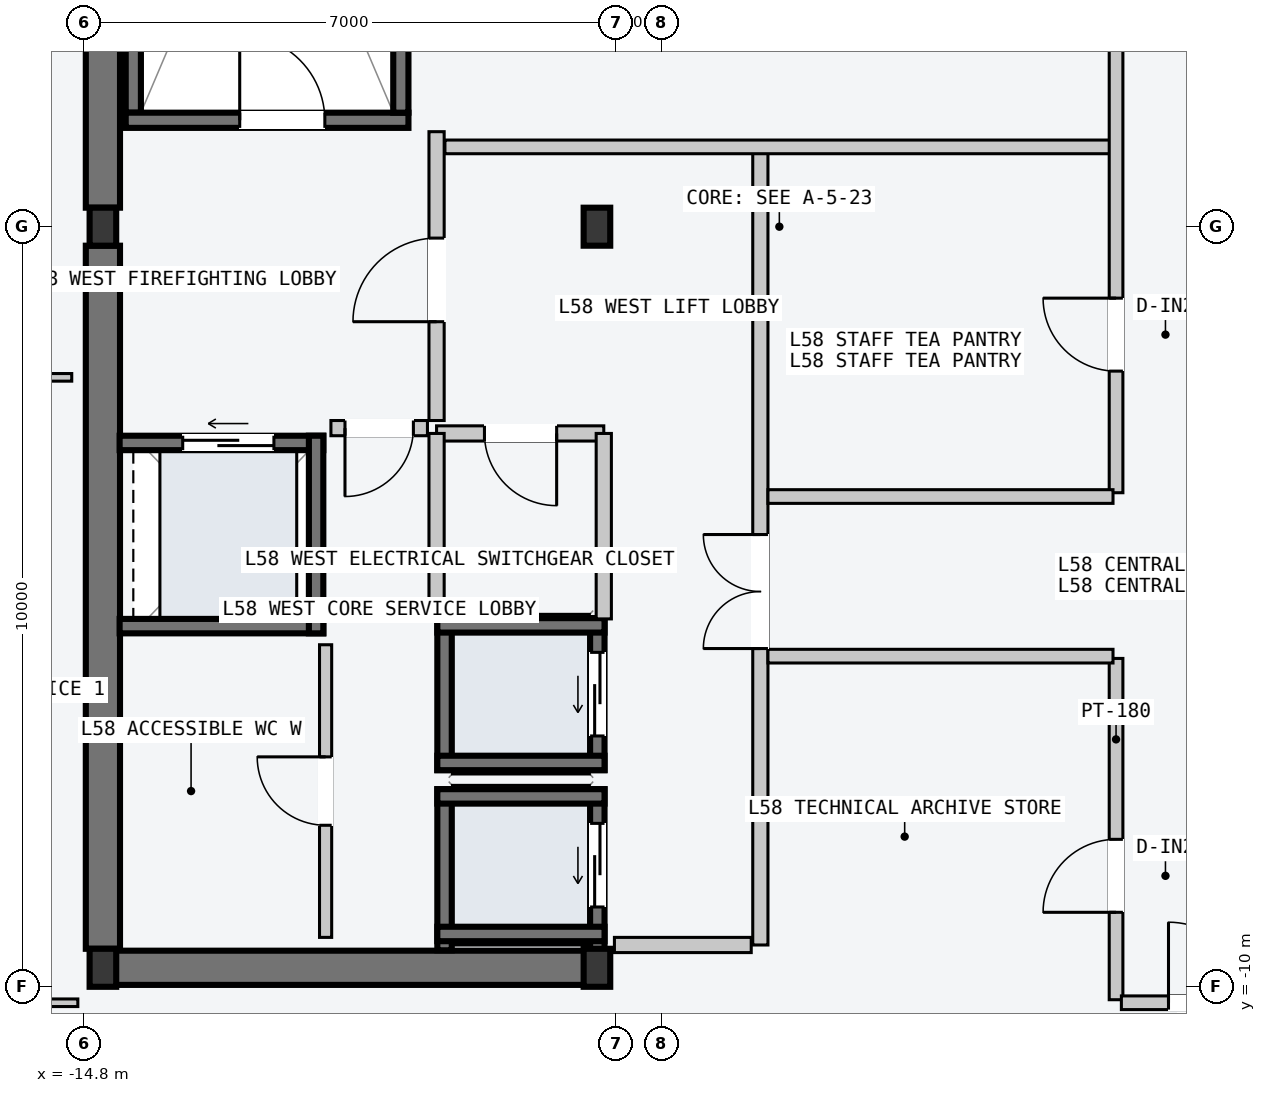
"""IFC4 building model, lengths in metres.
Left out: names, types, materials, properties, quantities, classifications, styles, units other than length and angle.
Written with IfcOpenShell. Run it as: python <this file> out.ifc"""

import sys

from ifc_helpers import new_model, si_unit, direction, frame, frame_2d, origin, origin_2d, place, context, subcontext, project, spatial, rectangle, i_section, extrude, element, fill, save


model = new_model("IFC4")
c1 = context("Model", 3, precision=1e-05, world=origin(), true_north=direction((0.0, 1.0)))
c2 = subcontext(c1, "Body", "Model", "MODEL_VIEW")
j1 = project(units=[si_unit("LENGTHUNIT", "METRE"), si_unit("PLANEANGLEUNIT", "RADIAN")], contexts=[c1])
p1 = place(None, origin())
s1 = spatial("IfcSite", under=j1, at=p1, CompositionType="ELEMENT")
p2 = place(p1, origin())
s2 = spatial("IfcBuilding", under=s1, at=p2, CompositionType="ELEMENT")
p3 = place(p2, frame((0.0, 0.0, 222.0)))
s3 = spatial("IfcBuildingStorey", under=s2, at=p3, CompositionType="ELEMENT", Elevation=222.0)
p4 = place(p3, frame((-14.53, -9.75, -0.2), z_axis=(0.0, 0.0, 1.0), x_axis=(1.0, 0.0, 0.0)))
e1 = element("IfcWall", 1, at=p4, inside=s3, PredefinedType="SHEAR", context=c2, shape_type="SweptSolid", body=[
    extrude(rectangle(XDim=6.46, YDim=0.45, at=frame_2d((3.23, 0.0))), origin(), (0.0, 0.0, 1.0), 3.6),
])
for number, where, z_axis, x_axis in (
    (2, (-14.55, -9.5, -0.2), (0.0, 0.0, 1.0), (0.0, 1.0, 0.0)),
    (3, (-14.55, 0.25, -0.2), (0.0, 0.0, 1.0), (0.0, 1.0, 0.0)),
):
    element("IfcWall", number, at=place(p3, frame(where, z_axis=z_axis, x_axis=x_axis)), inside=s3, PredefinedType="SHEAR", context=c2, shape_type="SweptSolid", body=[
        extrude(rectangle(XDim=9.25, YDim=0.45, at=frame_2d((4.625, 0.0))), origin(), (0.0, 0.0, 1.0), 3.6),
    ])
p5 = place(p3, frame((-14.15, 1.5, -0.2), z_axis=(0.0, 0.0, 1.0), x_axis=(0.0, 1.0, 0.0)))
e4 = element("IfcWall", 4, at=p5, inside=s3, PredefinedType="SOLIDWALL", context=c2, shape_type="SweptSolid", body=[
    extrude(rectangle(XDim=7.8, YDim=0.2, at=frame_2d((3.9, 0.0))), origin(), (0.0, 0.0, 1.0), 3.6),
])
p6 = place(p3, frame((-14.25, 1.4, -0.2), z_axis=(0.0, 0.0, 1.0), x_axis=(1.0, 0.0, 0.0)))
e5 = element("IfcWall", 5, at=p6, inside=s3, PredefinedType="SOLIDWALL", context=c2, shape_type="SweptSolid", body=[
    extrude(rectangle(XDim=3.72, YDim=0.2, at=frame_2d((1.86, 0.0))), origin(), (0.0, 0.0, 1.0), 3.6),
])
p7 = place(p6, frame((1.5, 0.0, 0.2)))
e6 = element("IfcOpeningElement", 6, at=p7, cuts=e5, PredefinedType="OPENING", context=c2, shape_type="SweptSolid", body=[
    extrude(rectangle(XDim=1.12, YDim=2.18, at=frame_2d((0.56, 1.09))), frame((0.0, 0.11, 0.0), z_axis=(0.0, -1.0, 0.0), x_axis=(1.0, 0.0, 0.0)), (0.0, 0.0, 1.0), 0.22),
])
p8 = place(p3, frame((-10.63, 1.5, -0.2), z_axis=(0.0, 0.0, 1.0), x_axis=(0.0, 1.0, 0.0)))
e7 = element("IfcWall", 7, at=p8, inside=s3, PredefinedType="SOLIDWALL", context=c2, shape_type="SweptSolid", body=[
    extrude(rectangle(XDim=7.8, YDim=0.2, at=frame_2d((3.9, 0.0))), origin(), (0.0, 0.0, 1.0), 3.6),
])
for number, where, z_axis, x_axis in (
    (8, (-14.55, -9.75, 0.0), (0.0, 0.0, 1.0), (1.0, 0.0, 0.0)),
    (9, (-14.55, 0.0, 0.0), (0.0, 0.0, 1.0), (1.0, 0.0, 0.0)),
    (10, (-8.05, -9.75, 0.0), (0.0, 0.0, 1.0), (1.0, 0.0, 0.0)),
    (11, (-8.05, 0.0, 0.0), (0.0, 0.0, 1.0), (1.0, 0.0, 0.0)),
):
    element("IfcColumn", number, at=place(p3, frame(where, z_axis=z_axis, x_axis=x_axis)), inside=s3, PredefinedType="COLUMN", context=c2, shape_type="SweptSolid", body=[
        extrude(i_section(OverallWidth=0.35, OverallDepth=0.5, WebThickness=0.02, FlangeThickness=0.032, at=origin_2d()), origin(), (0.0, 0.0, 1.0), 3.6),
    ])
p9 = place(p3, frame((-8.045, -9.52, -0.2), z_axis=(0.0, 0.0, 1.0), x_axis=(0.0, 1.0, 0.0)))
e12 = element("IfcWall", 12, at=p9, inside=s3, PredefinedType="SOLIDWALL", context=c2, shape_type="SweptSolid", body=[
    extrude(rectangle(XDim=2.12, YDim=0.19, at=frame_2d((1.06, 0.0))), origin(), (0.0, 0.0, 1.0), 3.6),
])
p10 = place(p9, frame((0.57, 0.0, 0.2)))
e13 = element("IfcOpeningElement", 13, at=p10, cuts=e12, PredefinedType="OPENING", context=c2, shape_type="SweptSolid", body=[
    extrude(rectangle(XDim=1.1, YDim=2.2, at=frame_2d((0.55, 1.1))), frame((0.0, 0.105, 0.0), z_axis=(0.0, -1.0, 0.0), x_axis=(1.0, 0.0, 0.0)), (0.0, 0.0, 1.0), 0.21),
])
p11 = place(p3, frame((-10.055, -9.52, -0.2), z_axis=(0.0, 0.0, 1.0), x_axis=(0.0, 1.0, 0.0)))
e14 = element("IfcWall", 14, at=p11, inside=s3, PredefinedType="SOLIDWALL", context=c2, shape_type="SweptSolid", body=[
    extrude(rectangle(XDim=2.12, YDim=0.19, at=frame_2d((1.06, 0.0))), origin(), (0.0, 0.0, 1.0), 3.6),
])
for number, where, z_axis, x_axis in (
    (15, (-10.15, -7.495, -0.2), (0.0, 0.0, 1.0), (1.0, 0.0, 0.0)),
    (16, (-10.15, -9.305, -0.2), (0.0, 0.0, 1.0), (1.0, 0.0, 0.0)),
):
    element("IfcWall", number, at=place(p3, frame(where, z_axis=z_axis, x_axis=x_axis)), inside=s3, PredefinedType="SOLIDWALL", context=c2, shape_type="SweptSolid", body=[
        extrude(rectangle(XDim=2.2, YDim=0.19, at=frame_2d((1.1, 0.0))), origin(), (0.0, 0.0, 1.0), 3.6),
    ])
p12 = place(p3, frame((-8.045, -7.15, -0.2), z_axis=(0.0, 0.0, 1.0), x_axis=(0.0, 1.0, 0.0)))
e17 = element("IfcWall", 17, at=p12, inside=s3, PredefinedType="SOLIDWALL", context=c2, shape_type="SweptSolid", body=[
    extrude(rectangle(XDim=2.0, YDim=0.19, at=frame_2d((1.0, 0.0))), origin(), (0.0, 0.0, 1.0), 3.6),
])
p13 = place(p12, frame((0.45, 0.0, 0.2)))
e18 = element("IfcOpeningElement", 18, at=p13, cuts=e17, PredefinedType="OPENING", context=c2, shape_type="SweptSolid", body=[
    extrude(rectangle(XDim=1.1, YDim=2.2, at=frame_2d((0.55, 1.1))), frame((0.0, 0.105, 0.0), z_axis=(0.0, -1.0, 0.0), x_axis=(1.0, 0.0, 0.0)), (0.0, 0.0, 1.0), 0.21),
])
p14 = place(p3, frame((-10.055, -7.15, -0.2), z_axis=(0.0, 0.0, 1.0), x_axis=(0.0, 1.0, 0.0)))
e19 = element("IfcWall", 19, at=p14, inside=s3, PredefinedType="SOLIDWALL", context=c2, shape_type="SweptSolid", body=[
    extrude(rectangle(XDim=2.0, YDim=0.19, at=frame_2d((1.0, 0.0))), origin(), (0.0, 0.0, 1.0), 3.6),
])
for number, where, z_axis, x_axis in (
    (20, (-10.15, -5.245, -0.2), (0.0, 0.0, 1.0), (1.0, 0.0, 0.0)),
    (21, (-10.15, -7.055, -0.2), (0.0, 0.0, 1.0), (1.0, 0.0, 0.0)),
):
    element("IfcWall", number, at=place(p3, frame(where, z_axis=z_axis, x_axis=x_axis)), inside=s3, PredefinedType="SOLIDWALL", context=c2, shape_type="SweptSolid", body=[
        extrude(rectangle(XDim=2.2, YDim=0.19, at=frame_2d((1.1, 0.0))), origin(), (0.0, 0.0, 1.0), 3.6),
    ])
p15 = place(p3, frame((-14.33, -2.845, -0.2), z_axis=(0.0, 0.0, 1.0), x_axis=(1.0, 0.0, 0.0)))
e22 = element("IfcWall", 22, at=p15, inside=s3, PredefinedType="SOLIDWALL", context=c2, shape_type="SweptSolid", body=[
    extrude(rectangle(XDim=2.68, YDim=0.19, at=frame_2d((1.34, 0.0))), origin(), (0.0, 0.0, 1.0), 3.6),
])
p16 = place(p15, frame((0.83, 0.0, 0.2)))
e23 = element("IfcOpeningElement", 23, at=p16, cuts=e22, PredefinedType="OPENING", context=c2, shape_type="SweptSolid", body=[
    extrude(rectangle(XDim=1.2, YDim=2.2, at=frame_2d((0.6, 1.1))), frame((0.0, 0.105, 0.0), z_axis=(0.0, -1.0, 0.0), x_axis=(1.0, 0.0, 0.0)), (0.0, 0.0, 1.0), 0.21),
])
p17 = place(p3, frame((-14.33, -5.255, -0.2), z_axis=(0.0, 0.0, 1.0), x_axis=(1.0, 0.0, 0.0)))
e24 = element("IfcWall", 24, at=p17, inside=s3, PredefinedType="SOLIDWALL", context=c2, shape_type="SweptSolid", body=[
    extrude(rectangle(XDim=2.68, YDim=0.19, at=frame_2d((1.34, 0.0))), origin(), (0.0, 0.0, 1.0), 3.6),
])
p18 = place(p3, frame((-11.745, -5.35, -0.2), z_axis=(0.0, 0.0, 1.0), x_axis=(0.0, 1.0, 0.0)))
e25 = element("IfcWall", 25, at=p18, inside=s3, PredefinedType="SOLIDWALL", context=c2, shape_type="SweptSolid", body=[
    extrude(rectangle(XDim=2.6, YDim=0.19, at=frame_2d((1.3, 0.0))), origin(), (0.0, 0.0, 1.0), 3.6),
])
p19 = place(p3, frame((-5.9, -9.45, 0.0), z_axis=(0.0, 0.0, 1.0), x_axis=(0.0, 1.0, 0.0)))
e26 = element("IfcWall", 26, at=p19, inside=s3, PredefinedType="PARTITIONING", context=c2, shape_type="SweptSolid", body=[
    extrude(rectangle(XDim=10.5, YDim=0.2, at=frame_2d((5.25, 0.0))), origin(), (0.0, 0.0, 1.0), 3.4),
])
p20 = place(p19, frame((3.9, 0.0, 0.0)))
e27 = element("IfcOpeningElement", 27, at=p20, cuts=e26, PredefinedType="OPENING", context=c2, shape_type="SweptSolid", body=[
    extrude(rectangle(XDim=1.5, YDim=2.2, at=frame_2d((0.75, 1.1))), frame((0.0, 0.11, 0.0), z_axis=(0.0, -1.0, 0.0), x_axis=(1.0, 0.0, 0.0)), (0.0, 0.0, 1.0), 0.22),
])
p21 = place(p3, frame((-6.02, -9.45, 0.0), z_axis=(0.0, 0.0, 1.0), x_axis=(-1.0, 0.0, 0.0)))
e28 = element("IfcWall", 28, at=p21, inside=s3, PredefinedType="PARTITIONING", context=c2, shape_type="SweptSolid", body=[
    extrude(rectangle(XDim=1.8, YDim=0.2, at=frame_2d((0.9, 0.0))), origin(), (0.0, 0.0, 1.0), 3.4),
])
p22 = place(p3, frame((-10.16, -2.55, 0.0), z_axis=(0.0, 0.0, 1.0), x_axis=(0.0, 1.0, 0.0)))
e29 = element("IfcWall", 29, at=p22, inside=s3, PredefinedType="PARTITIONING", context=c2, shape_type="SweptSolid", body=[
    extrude(rectangle(XDim=3.8, YDim=0.2, at=frame_2d((1.9, 0.0))), origin(), (0.0, 0.0, 1.0), 3.4),
])
p23 = place(p22, frame((1.3, 0.0, 0.0)))
e30 = element("IfcOpeningElement", 30, at=p23, cuts=e29, PredefinedType="OPENING", context=c2, shape_type="SweptSolid", body=[
    extrude(rectangle(XDim=1.1, YDim=2.15, at=frame_2d((0.55, 1.075))), frame((0.0, 0.11, 0.0), z_axis=(0.0, -1.0, 0.0), x_axis=(1.0, 0.0, 0.0)), (0.0, 0.0, 1.0), 0.22),
])
p24 = place(p3, frame((-10.28, -2.65, 0.0), z_axis=(0.0, 0.0, 1.0), x_axis=(-1.0, 0.0, 0.0)))
e31 = element("IfcWall", 31, at=p24, inside=s3, PredefinedType="PARTITIONING", context=c2, shape_type="SweptSolid", body=[
    extrude(rectangle(XDim=1.27, YDim=0.2, at=frame_2d((0.635, 0.0))), origin(), (0.0, 0.0, 1.0), 3.4),
])
p25 = place(p24, frame((0.185, 0.0, 0.0)))
e32 = element("IfcOpeningElement", 32, at=p25, cuts=e31, PredefinedType="OPENING", context=c2, shape_type="SweptSolid", body=[
    extrude(rectangle(XDim=0.9, YDim=2.15, at=frame_2d((0.45, 1.075))), frame((0.0, 0.11, 0.0), z_axis=(0.0, -1.0, 0.0), x_axis=(1.0, 0.0, 0.0)), (0.0, 0.0, 1.0), 0.22),
])
p26 = place(p3, frame((-7.96, -2.72, 0.0), z_axis=(0.0, 0.0, 1.0), x_axis=(-1.0, 0.0, 0.0)))
e33 = element("IfcWall", 33, at=p26, inside=s3, PredefinedType="PARTITIONING", context=c2, shape_type="SweptSolid", body=[
    extrude(rectangle(XDim=2.2, YDim=0.2, at=frame_2d((1.1, 0.0))), origin(), (0.0, 0.0, 1.0), 3.4),
])
p27 = place(p26, frame((0.62, 0.0, 0.0)))
e34 = element("IfcOpeningElement", 34, at=p27, cuts=e33, PredefinedType="OPENING", context=c2, shape_type="SweptSolid", body=[
    extrude(rectangle(XDim=0.95, YDim=2.1, at=frame_2d((0.475, 1.05))), frame((0.0, 0.11, 0.0), z_axis=(0.0, -1.0, 0.0), x_axis=(1.0, 0.0, 0.0)), (0.0, 0.0, 1.0), 0.22),
])
for number, where, z_axis, x_axis in (
    (35, (-7.96, -5.16, 0.0), (0.0, 0.0, 1.0), (0.0, 1.0, 0.0)),
    (36, (-10.16, -5.16, 0.0), (0.0, 0.0, 1.0), (0.0, 1.0, 0.0)),
):
    element("IfcWall", number, at=place(p3, frame(where, z_axis=z_axis, x_axis=x_axis)), inside=s3, PredefinedType="PARTITIONING", context=c2, shape_type="SweptSolid", body=[
        extrude(rectangle(XDim=2.44, YDim=0.2, at=frame_2d((1.22, 0.0))), origin(), (0.0, 0.0, 1.0), 3.4),
    ])
p28 = place(p3, frame((-11.62, -9.35, 0.0), z_axis=(0.0, 0.0, 1.0), x_axis=(0.0, 1.0, 0.0)))
e37 = element("IfcWall", 37, at=p28, inside=s3, PredefinedType="PARTITIONING", context=c2, shape_type="SweptSolid", body=[
    extrude(rectangle(XDim=3.85, YDim=0.16, at=frame_2d((1.925, 0.0))), origin(), (0.0, 0.0, 1.0), 3.4),
])
p29 = place(p28, frame((1.475, 0.0, 0.0)))
e38 = element("IfcOpeningElement", 38, at=p29, cuts=e37, PredefinedType="OPENING", context=c2, shape_type="SweptSolid", body=[
    extrude(rectangle(XDim=0.9, YDim=2.15, at=frame_2d((0.45, 1.075))), frame((0.0, 0.09, 0.0), z_axis=(0.0, -1.0, 0.0), x_axis=(1.0, 0.0, 0.0)), (0.0, 0.0, 1.0), 0.18),
])
p30 = place(p3, frame((-10.05, 1.05, 0.0), z_axis=(0.0, 0.0, 1.0), x_axis=(1.0, 0.0, 0.0)))
e39 = element("IfcWall", 39, at=p30, inside=s3, PredefinedType="PARTITIONING", context=c2, shape_type="SweptSolid", body=[
    extrude(rectangle(XDim=8.79, YDim=0.18, at=frame_2d((4.395, 0.0))), origin(), (0.0, 0.0, 1.0), 3.4),
])
p31 = place(p3, frame((-1.22, -3.5, 0.0), z_axis=(0.0, 0.0, 1.0), x_axis=(0.0, 1.0, 0.0)))
e40 = element("IfcWall", 40, at=p31, inside=s3, PredefinedType="PARTITIONING", context=c2, shape_type="SweptSolid", body=[
    extrude(rectangle(XDim=12.81, YDim=0.18, at=frame_2d((6.405, 0.0))), origin(), (0.0, 0.0, 1.0), 3.4),
])
p32 = place(p31, frame((6.1, 0.0, 0.0)))
e41 = element("IfcOpeningElement", 41, at=p32, cuts=e40, PredefinedType="OPENING", context=c2, shape_type="SweptSolid", body=[
    extrude(rectangle(XDim=1.24, YDim=2.24, at=frame_2d((0.62, 1.12))), frame((0.0, 0.1, 0.0), z_axis=(0.0, -1.0, 0.0), x_axis=(1.0, 0.0, 0.0)), (0.0, 0.0, 1.0), 0.2),
])
p33 = place(p31, frame((1.6, 0.0, 0.0)))
e42 = element("IfcOpeningElement", 42, at=p33, cuts=e40, PredefinedType="OPENING", context=c2, shape_type="SweptSolid", body=[
    extrude(rectangle(XDim=0.96, YDim=2.18, at=frame_2d((0.48, 1.09))), frame((0.0, 0.1, 0.0), z_axis=(0.0, -1.0, 0.0), x_axis=(1.0, 0.0, 0.0)), (0.0, 0.0, 1.0), 0.2),
])
p34 = place(p3, frame((-5.8, -3.55, 0.0), z_axis=(0.0, 0.0, 1.0), x_axis=(1.0, 0.0, 0.0)))
e43 = element("IfcWall", 43, at=p34, inside=s3, PredefinedType="PARTITIONING", context=c2, shape_type="SweptSolid", body=[
    extrude(rectangle(XDim=4.54, YDim=0.18, at=frame_2d((2.27, 0.0))), origin(), (0.0, 0.0, 1.0), 3.4),
])
p35 = place(p3, frame((-1.22, -10.17, 0.0), z_axis=(0.0, 0.0, 1.0), x_axis=(0.0, 1.0, 0.0)))
e44 = element("IfcWall", 44, at=p35, inside=s3, PredefinedType="PARTITIONING", context=c2, shape_type="SweptSolid", body=[
    extrude(rectangle(XDim=4.49, YDim=0.18, at=frame_2d((2.245, 0.0))), origin(), (0.0, 0.0, 1.0), 3.4),
])
p36 = place(p35, frame((1.15, 0.0, 0.0)))
e45 = element("IfcOpeningElement", 45, at=p36, cuts=e44, PredefinedType="OPENING", context=c2, shape_type="SweptSolid", body=[
    extrude(rectangle(XDim=0.96, YDim=2.18, at=frame_2d((0.48, 1.09))), frame((0.0, 0.1, 0.0), z_axis=(0.0, -1.0, 0.0), x_axis=(1.0, 0.0, 0.0)), (0.0, 0.0, 1.0), 0.2),
])
p37 = place(p3, frame((-5.8, -5.65, 0.0), z_axis=(0.0, 0.0, 1.0), x_axis=(1.0, 0.0, 0.0)))
e46 = element("IfcWall", 46, at=p37, inside=s3, PredefinedType="PARTITIONING", context=c2, shape_type="SweptSolid", body=[
    extrude(rectangle(XDim=4.54, YDim=0.18, at=frame_2d((2.27, 0.0))), origin(), (0.0, 0.0, 1.0), 3.4),
])
p38 = place(p3, frame((-1.15, -10.21, 0.0), z_axis=(0.0, 0.0, 1.0), x_axis=(1.0, 0.0, 0.0)))
e47 = element("IfcWall", 47, at=p38, inside=s3, PredefinedType="PARTITIONING", context=c2, shape_type="SweptSolid", body=[
    extrude(rectangle(XDim=2.3, YDim=0.18, at=frame_2d((1.15, 0.0))), origin(), (0.0, 0.0, 1.0), 3.4),
])
p39 = place(p38, frame((0.62, 0.0, 0.0)))
e48 = element("IfcOpeningElement", 48, at=p39, cuts=e47, PredefinedType="OPENING", context=c2, shape_type="SweptSolid", body=[
    extrude(rectangle(XDim=1.06, YDim=2.2, at=frame_2d((0.53, 1.1))), frame((0.0, 0.1, 0.0), z_axis=(0.0, -1.0, 0.0), x_axis=(1.0, 0.0, 0.0)), (0.0, 0.0, 1.0), 0.2),
])
p40 = place(p3, frame((-18.56, -10.21, 0.0), z_axis=(0.0, 0.0, 1.0), x_axis=(1.0, 0.0, 0.0)))
e49 = element("IfcWall", 49, at=p40, inside=s3, PredefinedType="PARTITIONING", context=c2, shape_type="SweptSolid", body=[
    extrude(rectangle(XDim=3.68, YDim=0.1, at=frame_2d((1.84, 0.0))), origin(), (0.0, 0.0, 1.0), 3.4),
])
p41 = place(p40, frame((1.36, 0.0, 0.0)))
e50 = element("IfcOpeningElement", 50, at=p41, cuts=e49, PredefinedType="OPENING", context=c2, shape_type="SweptSolid", body=[
    extrude(rectangle(XDim=0.96, YDim=2.18, at=frame_2d((0.48, 1.09))), frame((0.0, 0.06, 0.0), z_axis=(0.0, -1.0, 0.0), x_axis=(1.0, 0.0, 0.0)), (0.0, 0.0, 1.0), 0.12),
])
p42 = place(p3, frame((-18.56, -1.982, 0.0), z_axis=(0.0, 0.0, 1.0), x_axis=(1.0, 0.0, 0.0)))
e51 = element("IfcWall", 51, at=p42, inside=s3, PredefinedType="PARTITIONING", context=c2, shape_type="SweptSolid", body=[
    extrude(rectangle(XDim=3.6, YDim=0.1, at=frame_2d((1.8, 0.0))), origin(), (0.0, 0.0, 1.0), 3.4),
])
p43 = place(p42, frame((0.9, 0.0, 0.0)))
e52 = element("IfcOpeningElement", 52, at=p43, cuts=e51, PredefinedType="OPENING", context=c2, shape_type="SweptSolid", body=[
    extrude(rectangle(XDim=0.96, YDim=2.18, at=frame_2d((0.48, 1.09))), frame((0.0, 0.06, 0.0), z_axis=(0.0, -1.0, 0.0), x_axis=(1.0, 0.0, 0.0)), (0.0, 0.0, 1.0), 0.12),
])
p44 = place(p7, origin())
e53 = element("IfcDoor", 53, at=p44, inside=s3, OperationType="SINGLE_SWING_LEFT", PredefinedType="DOOR", context=c2, shape_type="SweptSolid", body=[
    extrude(rectangle(XDim=1.12, YDim=2.18, at=frame_2d((0.56, 1.09))), frame((0.0, 0.025, 0.0), z_axis=(0.0, -1.0, 0.0), x_axis=(1.0, 0.0, 0.0)), (0.0, 0.0, 1.0), 0.05),
])
fill(e6, e53)
p45 = place(p10, origin())
e54 = element("IfcDoor", 54, at=p45, inside=s3, OperationType="SLIDING_TO_LEFT", PredefinedType="DOOR", context=c2, shape_type="SweptSolid", body=[
    extrude(rectangle(XDim=1.1, YDim=2.2, at=frame_2d((0.55, 1.1))), frame((0.0, 0.025, 0.0), z_axis=(0.0, -1.0, 0.0), x_axis=(1.0, 0.0, 0.0)), (0.0, 0.0, 1.0), 0.05),
])
fill(e13, e54)
p46 = place(p13, origin())
e55 = element("IfcDoor", 55, at=p46, inside=s3, OperationType="SLIDING_TO_LEFT", PredefinedType="DOOR", context=c2, shape_type="SweptSolid", body=[
    extrude(rectangle(XDim=1.1, YDim=2.2, at=frame_2d((0.55, 1.1))), frame((0.0, 0.025, 0.0), z_axis=(0.0, -1.0, 0.0), x_axis=(1.0, 0.0, 0.0)), (0.0, 0.0, 1.0), 0.05),
])
fill(e18, e55)
p47 = place(p16, origin())
e56 = element("IfcDoor", 56, at=p47, inside=s3, OperationType="SLIDING_TO_LEFT", PredefinedType="DOOR", context=c2, shape_type="SweptSolid", body=[
    extrude(rectangle(XDim=1.2, YDim=2.2, at=frame_2d((0.6, 1.1))), frame((0.0, 0.025, 0.0), z_axis=(0.0, -1.0, 0.0), x_axis=(1.0, 0.0, 0.0)), (0.0, 0.0, 1.0), 0.05),
])
fill(e23, e56)
p48 = place(p20, origin())
e57 = element("IfcDoor", 57, at=p48, inside=s3, OperationType="DOUBLE_DOOR_SINGLE_SWING", PredefinedType="DOOR", context=c2, shape_type="SweptSolid", body=[
    extrude(rectangle(XDim=1.5, YDim=2.2, at=frame_2d((0.75, 1.1))), frame((0.0, 0.025, 0.0), z_axis=(0.0, -1.0, 0.0), x_axis=(1.0, 0.0, 0.0)), (0.0, 0.0, 1.0), 0.05),
])
fill(e27, e57)
p49 = place(p23, origin())
e58 = element("IfcDoor", 58, at=p49, inside=s3, OperationType="SINGLE_SWING_LEFT", PredefinedType="DOOR", context=c2, shape_type="SweptSolid", body=[
    extrude(rectangle(XDim=1.1, YDim=2.15, at=frame_2d((0.55, 1.075))), frame((0.0, 0.025, 0.0), z_axis=(0.0, -1.0, 0.0), x_axis=(1.0, 0.0, 0.0)), (0.0, 0.0, 1.0), 0.05),
])
fill(e30, e58)
p50 = place(p25, origin())
e59 = element("IfcDoor", 59, at=p50, inside=s3, OperationType="SINGLE_SWING_RIGHT", PredefinedType="DOOR", context=c2, shape_type="SweptSolid", body=[
    extrude(rectangle(XDim=0.9, YDim=2.15, at=frame_2d((0.45, 1.075))), frame((0.0, 0.025, 0.0), z_axis=(0.0, -1.0, 0.0), x_axis=(1.0, 0.0, 0.0)), (0.0, 0.0, 1.0), 0.05),
])
fill(e32, e59)
p51 = place(p27, origin())
e60 = element("IfcDoor", 60, at=p51, inside=s3, OperationType="SINGLE_SWING_LEFT", PredefinedType="DOOR", context=c2, shape_type="SweptSolid", body=[
    extrude(rectangle(XDim=0.95, YDim=2.1, at=frame_2d((0.475, 1.05))), frame((0.0, 0.025, 0.0), z_axis=(0.0, -1.0, 0.0), x_axis=(1.0, 0.0, 0.0)), (0.0, 0.0, 1.0), 0.05),
])
fill(e34, e60)
p52 = place(p29, origin())
e61 = element("IfcDoor", 61, at=p52, inside=s3, OperationType="SINGLE_SWING_RIGHT", PredefinedType="DOOR", context=c2, shape_type="SweptSolid", body=[
    extrude(rectangle(XDim=0.9, YDim=2.15, at=frame_2d((0.45, 1.075))), frame((0.0, 0.025, 0.0), z_axis=(0.0, -1.0, 0.0), x_axis=(1.0, 0.0, 0.0)), (0.0, 0.0, 1.0), 0.05),
])
fill(e38, e61)
p53 = place(p33, origin())
e62 = element("IfcDoor", 62, at=p53, inside=s3, OperationType="SINGLE_SWING_RIGHT", PredefinedType="DOOR", context=c2, shape_type="SweptSolid", body=[
    extrude(rectangle(XDim=0.96, YDim=2.18, at=frame_2d((0.48, 1.09))), frame((0.0, 0.025, 0.0), z_axis=(0.0, -1.0, 0.0), x_axis=(1.0, 0.0, 0.0)), (0.0, 0.0, 1.0), 0.05),
])
fill(e42, e62)
p54 = place(p36, origin())
e63 = element("IfcDoor", 63, at=p54, inside=s3, OperationType="SINGLE_SWING_LEFT", PredefinedType="DOOR", context=c2, shape_type="SweptSolid", body=[
    extrude(rectangle(XDim=0.96, YDim=2.18, at=frame_2d((0.48, 1.09))), frame((0.0, 0.025, 0.0), z_axis=(0.0, -1.0, 0.0), x_axis=(1.0, 0.0, 0.0)), (0.0, 0.0, 1.0), 0.05),
])
fill(e45, e63)
p55 = place(p39, origin())
e64 = element("IfcDoor", 64, at=p55, inside=s3, OperationType="SINGLE_SWING_LEFT", PredefinedType="DOOR", context=c2, shape_type="SweptSolid", body=[
    extrude(rectangle(XDim=1.06, YDim=2.2, at=frame_2d((0.53, 1.1))), frame((0.0, 0.025, 0.0), z_axis=(0.0, -1.0, 0.0), x_axis=(1.0, 0.0, 0.0)), (0.0, 0.0, 1.0), 0.05),
])
fill(e48, e64)
save(model, sys.argv[1])
